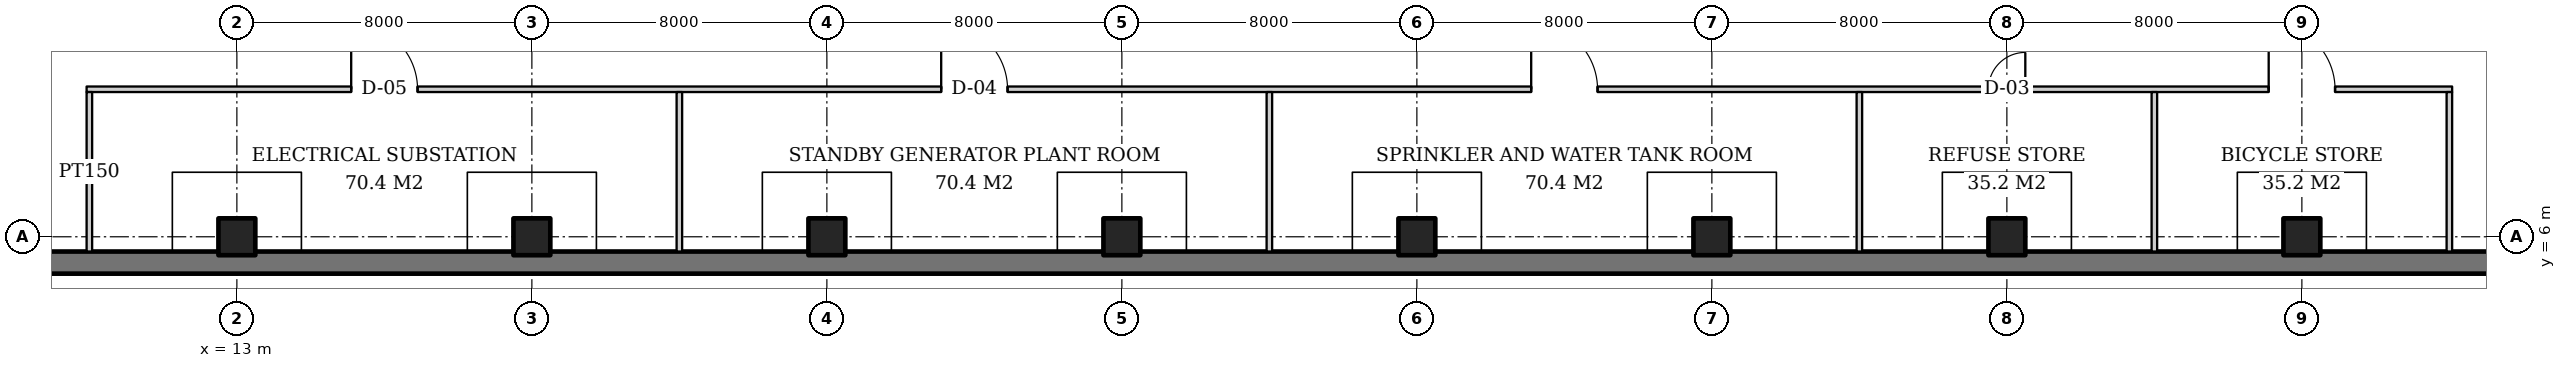
"""IFC4 building model, lengths in metres.
Left out: names, types, materials, properties, quantities, classifications, styles, units other than length and angle.
Written with IfcOpenShell. Run it as: python <this file> out.ifc"""

import sys

from ifc_helpers import new_model, si_unit, direction, frame, frame_2d, origin, origin_2d, place, context, subcontext, project, spatial, rectangle, extrude, element, fill, save


model = new_model("IFC4")
c1 = context("Model", 3, precision=1e-05, world=origin(), true_north=direction((0.0, 1.0)))
c2 = subcontext(c1, "Body", "Model", "MODEL_VIEW")
j1 = project(units=[si_unit("LENGTHUNIT", "METRE"), si_unit("PLANEANGLEUNIT", "RADIAN")], contexts=[c1])
p1 = place(None, origin())
s1 = spatial("IfcSite", under=j1, at=p1, CompositionType="ELEMENT")
p2 = place(p1, origin())
s2 = spatial("IfcBuilding", under=s1, at=p2, CompositionType="ELEMENT")
p3 = place(p2, frame((0.0, 0.0, -10.0)))
s3 = spatial("IfcBuildingStorey", under=s2, at=p3, CompositionType="ELEMENT", Elevation=-10.0)
for number, where, z_axis, x_axis in (
    (1, (13.0, 6.0, 0.0), (0.0, 0.0, 1.0), (1.0, 0.0, 0.0)),
    (2, (21.0, 6.0, 0.0), (0.0, 0.0, 1.0), (1.0, 0.0, 0.0)),
    (3, (29.0, 6.0, 0.0), (0.0, 0.0, 1.0), (1.0, 0.0, 0.0)),
    (4, (37.0, 6.0, 0.0), (0.0, 0.0, 1.0), (1.0, 0.0, 0.0)),
    (5, (45.0, 6.0, 0.0), (0.0, 0.0, 1.0), (1.0, 0.0, 0.0)),
    (6, (53.0, 6.0, 0.0), (0.0, 0.0, 1.0), (1.0, 0.0, 0.0)),
    (7, (61.0, 6.0, 0.0), (0.0, 0.0, 1.0), (1.0, 0.0, 0.0)),
    (8, (69.0, 6.0, 0.0), (0.0, 0.0, 1.0), (1.0, 0.0, 0.0)),
):
    element("IfcColumn", number, at=place(p3, frame(where, z_axis=z_axis, x_axis=x_axis)), inside=s3, PredefinedType="COLUMN", context=c2, shape_type="SweptSolid", body=[
        extrude(rectangle(XDim=1.0, YDim=1.0, at=origin_2d()), origin(), (0.0, 0.0, 1.0), 5.0),
    ])
p4 = place(p3, frame((4.0, 5.3, -0.5), z_axis=(0.0, 0.0, 1.0), x_axis=(1.0, 0.0, 0.0)))
e9 = element("IfcWall", 9, at=p4, inside=s3, PredefinedType="USERDEFINED", context=c2, shape_type="SweptSolid", body=[
    extrude(rectangle(XDim=80.975, YDim=0.6, at=frame_2d((40.488, 0.0))), origin(), (0.0, 0.0, 1.0), 5.5),
])
p5 = place(p3, frame((8.925, 10.0, 0.0), z_axis=(0.0, 0.0, 1.0), x_axis=(1.0, 0.0, 0.0)))
e10 = element("IfcWall", 10, at=p5, inside=s3, PredefinedType="PARTITIONING", context=c2, shape_type="SweptSolid", body=[
    extrude(rectangle(XDim=64.15, YDim=0.15, at=frame_2d((32.075, 0.0))), origin(), (0.0, 0.0, 1.0), 4.7),
])
p6 = place(p5, frame((7.175, 0.0, 0.0)))
e11 = element("IfcOpeningElement", 11, at=p6, cuts=e10, PredefinedType="OPENING", context=c2, shape_type="SweptSolid", body=[
    extrude(rectangle(XDim=1.8, YDim=2.4, at=frame_2d((0.9, 1.2))), frame((0.0, 0.085, 0.0), z_axis=(0.0, -1.0, 0.0), x_axis=(1.0, 0.0, 0.0)), (0.0, 0.0, 1.0), 0.17),
])
p7 = place(p5, frame((23.175, 0.0, 0.0)))
e12 = element("IfcOpeningElement", 12, at=p7, cuts=e10, PredefinedType="OPENING", context=c2, shape_type="SweptSolid", body=[
    extrude(rectangle(XDim=1.8, YDim=2.4, at=frame_2d((0.9, 1.2))), frame((0.0, 0.085, 0.0), z_axis=(0.0, -1.0, 0.0), x_axis=(1.0, 0.0, 0.0)), (0.0, 0.0, 1.0), 0.17),
])
p8 = place(p5, frame((39.175, 0.0, 0.0)))
e13 = element("IfcOpeningElement", 13, at=p8, cuts=e10, PredefinedType="OPENING", context=c2, shape_type="SweptSolid", body=[
    extrude(rectangle(XDim=1.8, YDim=2.4, at=frame_2d((0.9, 1.2))), frame((0.0, 0.085, 0.0), z_axis=(0.0, -1.0, 0.0), x_axis=(1.0, 0.0, 0.0)), (0.0, 0.0, 1.0), 0.17),
])
p9 = place(p5, frame((51.575, 0.0, 0.0)))
e14 = element("IfcOpeningElement", 14, at=p9, cuts=e10, PredefinedType="OPENING", context=c2, shape_type="SweptSolid", body=[
    extrude(rectangle(XDim=1.0, YDim=2.1, at=frame_2d((0.5, 1.05))), frame((0.0, 0.085, 0.0), z_axis=(0.0, -1.0, 0.0), x_axis=(1.0, 0.0, 0.0)), (0.0, 0.0, 1.0), 0.17),
])
p10 = place(p5, frame((59.175, 0.0, 0.0)))
e15 = element("IfcOpeningElement", 15, at=p10, cuts=e10, PredefinedType="OPENING", context=c2, shape_type="SweptSolid", body=[
    extrude(rectangle(XDim=1.8, YDim=2.4, at=frame_2d((0.9, 1.2))), frame((0.0, 0.085, 0.0), z_axis=(0.0, -1.0, 0.0), x_axis=(1.0, 0.0, 0.0)), (0.0, 0.0, 1.0), 0.17),
])
for number, where, z_axis, x_axis in (
    (16, (9.0, 9.925, 0.0), (0.0, 0.0, 1.0), (0.0, -1.0, 0.0)),
    (17, (25.0, 9.925, 0.0), (0.0, 0.0, 1.0), (0.0, -1.0, 0.0)),
    (18, (41.0, 9.925, 0.0), (0.0, 0.0, 1.0), (0.0, -1.0, 0.0)),
    (19, (57.0, 9.925, 0.0), (0.0, 0.0, 1.0), (0.0, -1.0, 0.0)),
    (20, (65.0, 9.925, 0.0), (0.0, 0.0, 1.0), (0.0, -1.0, 0.0)),
    (21, (73.0, 9.925, 0.0), (0.0, 0.0, 1.0), (0.0, -1.0, 0.0)),
):
    element("IfcWall", number, at=place(p3, frame(where, z_axis=z_axis, x_axis=x_axis)), inside=s3, PredefinedType="PARTITIONING", context=c2, shape_type="SweptSolid", body=[
        extrude(rectangle(XDim=4.325, YDim=0.15, at=frame_2d((2.163, 0.0))), origin(), (0.0, 0.0, 1.0), 4.7),
    ])
p11 = place(p6, origin())
e22 = element("IfcDoor", 22, at=p11, inside=s3, OperationType="DOUBLE_DOOR_SINGLE_SWING", PredefinedType="DOOR", context=c2, shape_type="SweptSolid", body=[
    extrude(rectangle(XDim=1.8, YDim=2.4, at=frame_2d((0.9, 1.2))), frame((0.0, 0.025, 0.0), z_axis=(0.0, -1.0, 0.0), x_axis=(1.0, 0.0, 0.0)), (0.0, 0.0, 1.0), 0.05),
])
fill(e11, e22)
p12 = place(p7, origin())
e23 = element("IfcDoor", 23, at=p12, inside=s3, OperationType="DOUBLE_DOOR_SINGLE_SWING", PredefinedType="DOOR", context=c2, shape_type="SweptSolid", body=[
    extrude(rectangle(XDim=1.8, YDim=2.4, at=frame_2d((0.9, 1.2))), frame((0.0, 0.025, 0.0), z_axis=(0.0, -1.0, 0.0), x_axis=(1.0, 0.0, 0.0)), (0.0, 0.0, 1.0), 0.05),
])
fill(e12, e23)
p13 = place(p8, origin())
e24 = element("IfcDoor", 24, at=p13, inside=s3, OperationType="DOUBLE_DOOR_SINGLE_SWING", PredefinedType="DOOR", context=c2, shape_type="SweptSolid", body=[
    extrude(rectangle(XDim=1.8, YDim=2.4, at=frame_2d((0.9, 1.2))), frame((0.0, 0.025, 0.0), z_axis=(0.0, -1.0, 0.0), x_axis=(1.0, 0.0, 0.0)), (0.0, 0.0, 1.0), 0.05),
])
fill(e13, e24)
p14 = place(p9, origin())
e25 = element("IfcDoor", 25, at=p14, inside=s3, OperationType="SINGLE_SWING_RIGHT", PredefinedType="DOOR", context=c2, shape_type="SweptSolid", body=[
    extrude(rectangle(XDim=1.0, YDim=2.1, at=frame_2d((0.5, 1.05))), frame((0.0, 0.025, 0.0), z_axis=(0.0, -1.0, 0.0), x_axis=(1.0, 0.0, 0.0)), (0.0, 0.0, 1.0), 0.05),
])
fill(e14, e25)
p15 = place(p10, origin())
e26 = element("IfcDoor", 26, at=p15, inside=s3, OperationType="DOUBLE_DOOR_SINGLE_SWING", PredefinedType="DOOR", context=c2, shape_type="SweptSolid", body=[
    extrude(rectangle(XDim=1.8, YDim=2.4, at=frame_2d((0.9, 1.2))), frame((0.0, 0.025, 0.0), z_axis=(0.0, -1.0, 0.0), x_axis=(1.0, 0.0, 0.0)), (0.0, 0.0, 1.0), 0.05),
])
fill(e15, e26)
save(model, sys.argv[1])
